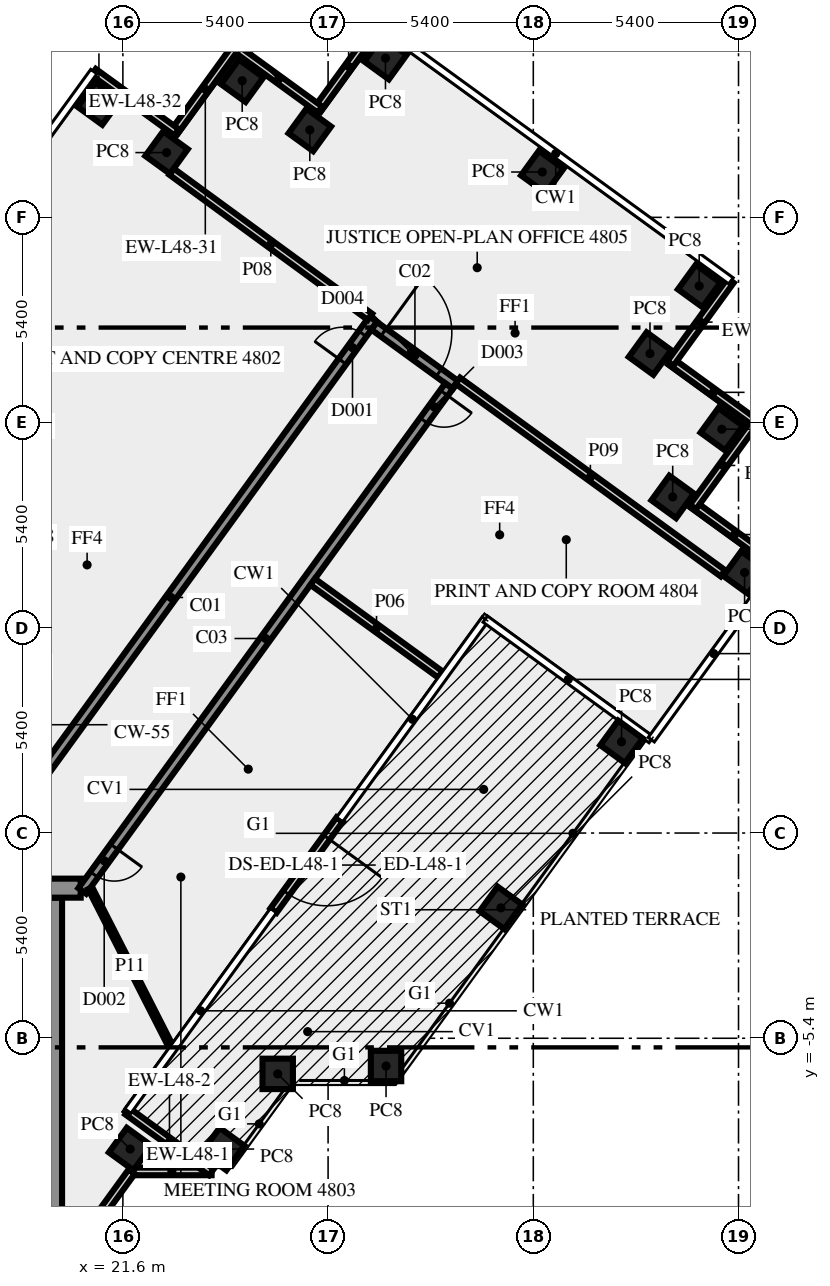
"""IFC4 building model, lengths in metres.
Left out: names, types, materials, properties, quantities, classifications, styles, units other than length and angle.
Written with IfcOpenShell. Run it as: python <this file> out.ifc"""

import sys

from ifc_helpers import new_model, si_unit, direction, frame, frame_2d, origin, origin_2d, place, context, subcontext, project, spatial, rectangle, extrude, element, fill, save


model = new_model("IFC4")
c1 = context("Model", 3, precision=1e-05, world=origin(), true_north=direction((0.0, 1.0)))
c2 = subcontext(c1, "Body", "Model", "MODEL_VIEW")
j1 = project(units=[si_unit("LENGTHUNIT", "METRE"), si_unit("PLANEANGLEUNIT", "RADIAN")], contexts=[c1])
p1 = place(None, origin())
s1 = spatial("IfcSite", under=j1, at=p1, CompositionType="ELEMENT")
p2 = place(p1, origin())
s2 = spatial("IfcBuilding", under=s1, at=p2, CompositionType="ELEMENT")
p3 = place(p2, frame((0.0, 0.0, 206.0)))
s3 = spatial("IfcBuildingStorey", under=s2, at=p3, CompositionType="ELEMENT", Elevation=206.0)
for number, where, z_axis, x_axis in (
    (1, (21.792, -8.315, 0.0), (0.0, 0.0, 1.0), (0.588, 0.809, 0.0)),
    (2, (24.235, -8.315, 0.0), (0.0, 0.0, 1.0), (0.588, 0.809, 0.0)),
    (3, (25.674, -6.337, 0.0), (0.0, 0.0, 1.0), (1.0, 0.0, 0.0)),
    (4, (28.525, -6.13, 0.0), (0.0, 0.0, 1.0), (1.0, 0.0, 0.0)),
    (5, (31.548, -1.969, 0.0), (0.0, 0.0, 1.0), (0.588, 0.809, 0.0)),
    (6, (34.722, 2.4, 0.0), (0.0, 0.0, 1.0), (0.588, 0.809, 0.0)),
    (7, (37.96, 6.855, 0.0), (0.0, 0.0, 1.0), (0.588, 0.809, 0.0)),
    (8, (36.068, 8.844, 0.0), (0.0, 0.0, 1.0), (0.588, 0.809, 0.0)),
    (9, (37.36, 10.625, 0.0), (0.0, 0.0, 1.0), (0.588, 0.809, 0.0)),
    (10, (35.471, 12.616, 0.0), (0.0, 0.0, 1.0), (-0.809, 0.588, 0.0)),
    (11, (36.765, 14.395, 0.0), (0.0, 0.0, 1.0), (-0.809, 0.588, 0.0)),
    (12, (32.637, 17.393, 0.0), (0.0, 0.0, 1.0), (-0.809, 0.588, 0.0)),
    (13, (28.51, 20.39, 0.0), (0.0, 0.0, 1.0), (-0.588, -0.809, 0.0)),
    (14, (26.519, 18.5, 0.0), (0.0, 0.0, 1.0), (-0.809, 0.588, 0.0)),
    (15, (24.74, 19.795, 0.0), (0.0, 0.0, 1.0), (-0.588, -0.809, 0.0)),
    (16, (22.749, 17.904, 0.0), (0.0, 0.0, 1.0), (-0.588, -0.809, 0.0)),
    (17, (20.97, 19.195, 0.0), (0.0, 0.0, 1.0), (-0.588, -0.809, 0.0)),
):
    element("IfcColumn", number, at=place(p3, frame(where, z_axis=z_axis, x_axis=x_axis)), inside=s3, PredefinedType="COLUMN", context=c2, shape_type="SweptSolid", body=[
        extrude(rectangle(XDim=0.8, YDim=0.8, at=origin_2d()), origin(), (0.0, 0.0, 1.0), 3.65),
    ])
p4 = place(p3, frame((21.843, -8.904, 0.0), z_axis=(0.0, 0.0, 1.0), x_axis=(1.0, 0.0, 0.0)))
e18 = element("IfcWall", 18, at=p4, inside=s3, PredefinedType="SOLIDWALL", context=c2, shape_type="SweptSolid", body=[
    extrude(rectangle(XDim=2.092, YDim=0.2, at=frame_2d((1.046, 0.0))), origin(), (0.0, 0.0, 1.0), 3.65),
])
p5 = place(p3, frame((23.928, -8.925, 0.0), z_axis=(0.0, 0.0, 1.0), x_axis=(-0.809038277723, 0.587755957162, 0.0)))
e19 = element("IfcWall", 19, at=p5, inside=s3, PredefinedType="SOLIDWALL", context=c2, shape_type="SweptSolid", body=[
    extrude(rectangle(XDim=2.724, YDim=0.2, at=frame_2d((1.362, 0.0))), origin(), (0.0, 0.0, 1.0), 3.65),
])
p6 = place(p3, frame((27.304, 0.356, 0.0), z_axis=(0.0, 0.0, 1.0), x_axis=(-0.587774760134, -0.809024617271, 0.0)))
e20 = element("IfcWall", 20, at=p6, inside=s3, PredefinedType="SOLIDWALL", context=c2, shape_type="SweptSolid", body=[
    extrude(rectangle(XDim=2.963, YDim=0.2, at=frame_2d((1.481, 0.0))), origin(), (0.0, 0.0, 1.0), 3.65),
])
p7 = place(p6, frame((0.582, 0.0, 0.0)))
e21 = element("IfcOpeningElement", 21, at=p7, cuts=e20, PredefinedType="OPENING", context=c2, shape_type="SweptSolid", body=[
    extrude(rectangle(XDim=1.8, YDim=2.4, at=frame_2d((0.9, 1.2))), frame((0.0, 0.11, 0.0), z_axis=(0.0, -1.0, 0.0), x_axis=(1.0, 0.0, 0.0)), (0.0, 0.0, 1.0), 0.22),
])
p8 = place(p3, frame((38.748, 7.09, 0.0), z_axis=(0.0, 0.0, 1.0), x_axis=(-0.80901210161, 0.587791986546, 0.0)))
e22 = element("IfcWall", 22, at=p8, inside=s3, PredefinedType="SOLIDWALL", context=c2, shape_type="SweptSolid", body=[
    extrude(rectangle(XDim=2.6, YDim=0.2, at=frame_2d((1.3, 0.0))), origin(), (0.0, 0.0, 1.0), 3.65),
])
for number, where, z_axis, x_axis in (
    (23, (36.602, 8.58, 0.0), (0.0, 0.0, 1.0), (0.588, 0.809, 0.0)),
    (24, (38.231, 10.802, 0.0), (0.0, 0.0, 1.0), (-0.809, 0.588, 0.0)),
):
    element("IfcWall", number, at=place(p3, frame(where, z_axis=z_axis, x_axis=x_axis)), inside=s3, PredefinedType="SOLIDWALL", context=c2, shape_type="SweptSolid", body=[
        extrude(rectangle(XDim=2.7, YDim=0.2, at=frame_2d((1.35, 0.0))), origin(), (0.0, 0.0, 1.0), 3.65),
    ])
p9 = place(p3, frame((20.253, -11.083, 0.0), z_axis=(0.0, 0.0, 1.0), x_axis=(0.587766567315, 0.809030569476, 0.0)))
e25 = element("IfcWall", 25, at=p9, inside=s3, PredefinedType="SOLIDWALL", context=c2, shape_type="SweptSolid", body=[
    extrude(rectangle(XDim=2.688, YDim=0.2, at=frame_2d((1.344, 0.0))), origin(), (0.0, 0.0, 1.0), 3.65),
])
for number, where, z_axis, x_axis in (
    (26, (36.005, 12.352, 0.0), (0.0, 0.0, 1.0), (0.588, 0.809, 0.0)),
    (27, (28.334, 21.262, 0.0), (0.0, 0.0, 1.0), (-0.588, -0.809, 0.0)),
):
    element("IfcWall", number, at=place(p3, frame(where, z_axis=z_axis, x_axis=x_axis)), inside=s3, PredefinedType="SOLIDWALL", context=c2, shape_type="SweptSolid", body=[
        extrude(rectangle(XDim=2.7, YDim=0.2, at=frame_2d((1.35, 0.0))), origin(), (0.0, 0.0, 1.0), 3.65),
    ])
p10 = place(p3, frame((26.785, 19.036, 0.0), z_axis=(0.0, 0.0, 1.0), x_axis=(-0.809064397168, 0.587720002413, 0.0)))
e28 = element("IfcWall", 28, at=p10, inside=s3, PredefinedType="SOLIDWALL", context=c2, shape_type="SweptSolid", body=[
    extrude(rectangle(XDim=2.7, YDim=0.2, at=frame_2d((1.35, 0.0))), origin(), (0.0, 0.0, 1.0), 3.65),
])
for number, where, z_axis, x_axis in (
    (29, (24.563, 20.665, 0.0), (0.0, 0.0, 1.0), (-0.588, -0.809, 0.0)),
    (30, (23.013, 18.438, 0.0), (0.0, 0.0, 1.0), (-0.809, 0.588, 0.0)),
):
    element("IfcWall", number, at=place(p3, frame(where, z_axis=z_axis, x_axis=x_axis)), inside=s3, PredefinedType="SOLIDWALL", context=c2, shape_type="SweptSolid", body=[
        extrude(rectangle(XDim=2.7, YDim=0.2, at=frame_2d((1.35, 0.0))), origin(), (0.0, 0.0, 1.0), 3.65),
    ])
p11 = place(p3, frame((19.75, -10.5, 0.0), z_axis=(0.0, 0.0, 1.0), x_axis=(0.0, 1.0, 0.0)))
e31 = element("IfcWall", 31, at=p11, inside=s3, PredefinedType="SHEAR", context=c2, shape_type="SweptSolid", body=[
    extrude(rectangle(XDim=8.8, YDim=0.5, at=frame_2d((4.4, 0.0))), origin(), (0.0, 0.0, 1.0), 3.65),
])
p12 = place(p3, frame((20.49, -1.45, 0.0), z_axis=(0.0, 0.0, 1.0), x_axis=(-1.0, 0.0, 0.0)))
e32 = element("IfcWall", 32, at=p12, inside=s3, PredefinedType="SHEAR", context=c2, shape_type="SweptSolid", body=[
    extrude(rectangle(XDim=40.98, YDim=0.5, at=frame_2d((20.49, 0.0))), origin(), (0.0, 0.0, 1.0), 3.65),
])
p13 = place(p12, frame((38.14, 0.0, 0.0)))
e33 = element("IfcOpeningElement", 33, at=p13, cuts=e32, PredefinedType="OPENING", context=c2, shape_type="SweptSolid", body=[
    extrude(rectangle(XDim=1.8, YDim=2.1, at=frame_2d((0.9, 1.05))), frame((0.0, 0.26, 0.0), z_axis=(0.0, -1.0, 0.0), x_axis=(1.0, 0.0, 0.0)), (0.0, 0.0, 1.0), 0.52),
])
p14 = place(p12, frame((36.728, 0.0, 0.0)))
e34 = element("IfcOpeningElement", 34, at=p14, cuts=e32, PredefinedType="OPENING", context=c2, shape_type="SweptSolid", body=[
    extrude(rectangle(XDim=0.8, YDim=2.1, at=frame_2d((0.4, 1.05))), frame((0.0, 0.26, 0.0), z_axis=(0.0, -1.0, 0.0), x_axis=(1.0, 0.0, 0.0)), (0.0, 0.0, 1.0), 0.52),
])
p15 = place(p12, frame((35.153, 0.0, 0.0)))
e35 = element("IfcOpeningElement", 35, at=p15, cuts=e32, PredefinedType="OPENING", context=c2, shape_type="SweptSolid", body=[
    extrude(rectangle(XDim=0.8, YDim=2.1, at=frame_2d((0.4, 1.05))), frame((0.0, 0.26, 0.0), z_axis=(0.0, -1.0, 0.0), x_axis=(1.0, 0.0, 0.0)), (0.0, 0.0, 1.0), 0.52),
])
p16 = place(p12, frame((32.94, 0.0, 0.0)))
e36 = element("IfcOpeningElement", 36, at=p16, cuts=e32, PredefinedType="OPENING", context=c2, shape_type="SweptSolid", body=[
    extrude(rectangle(XDim=0.9, YDim=2.1, at=frame_2d((0.45, 1.05))), frame((0.0, 0.26, 0.0), z_axis=(0.0, -1.0, 0.0), x_axis=(1.0, 0.0, 0.0)), (0.0, 0.0, 1.0), 0.52),
])
p17 = place(p12, frame((30.702, 0.0, 0.0)))
e37 = element("IfcOpeningElement", 37, at=p17, cuts=e32, PredefinedType="OPENING", context=c2, shape_type="SweptSolid", body=[
    extrude(rectangle(XDim=0.9, YDim=2.1, at=frame_2d((0.45, 1.05))), frame((0.0, 0.26, 0.0), z_axis=(0.0, -1.0, 0.0), x_axis=(1.0, 0.0, 0.0)), (0.0, 0.0, 1.0), 0.52),
])
p18 = place(p12, frame((28.64, 0.0, 0.0)))
e38 = element("IfcOpeningElement", 38, at=p18, cuts=e32, PredefinedType="OPENING", context=c2, shape_type="SweptSolid", body=[
    extrude(rectangle(XDim=0.9, YDim=2.1, at=frame_2d((0.45, 1.05))), frame((0.0, 0.26, 0.0), z_axis=(0.0, -1.0, 0.0), x_axis=(1.0, 0.0, 0.0)), (0.0, 0.0, 1.0), 0.52),
])
p19 = place(p12, frame((25.778, 0.0, 0.0)))
e39 = element("IfcOpeningElement", 39, at=p19, cuts=e32, PredefinedType="OPENING", context=c2, shape_type="SweptSolid", body=[
    extrude(rectangle(XDim=0.9, YDim=2.1, at=frame_2d((0.45, 1.05))), frame((0.0, 0.26, 0.0), z_axis=(0.0, -1.0, 0.0), x_axis=(1.0, 0.0, 0.0)), (0.0, 0.0, 1.0), 0.52),
])
p20 = place(p12, frame((19.59, 0.0, 0.0)))
e40 = element("IfcOpeningElement", 40, at=p20, cuts=e32, PredefinedType="OPENING", context=c2, shape_type="SweptSolid", body=[
    extrude(rectangle(XDim=2.0, YDim=2.1, at=frame_2d((1.0, 1.05))), frame((0.0, 0.26, 0.0), z_axis=(0.0, -1.0, 0.0), x_axis=(1.0, 0.0, 0.0)), (0.0, 0.0, 1.0), 0.52),
])
p21 = place(p12, frame((7.14, 0.0, 0.0)))
e41 = element("IfcOpeningElement", 41, at=p21, cuts=e32, PredefinedType="OPENING", context=c2, shape_type="SweptSolid", body=[
    extrude(rectangle(XDim=0.9, YDim=2.1, at=frame_2d((0.45, 1.05))), frame((0.0, 0.26, 0.0), z_axis=(0.0, -1.0, 0.0), x_axis=(1.0, 0.0, 0.0)), (0.0, 0.0, 1.0), 0.52),
])
p22 = place(p12, frame((4.19, 0.0, 0.0)))
e42 = element("IfcOpeningElement", 42, at=p22, cuts=e32, PredefinedType="OPENING", context=c2, shape_type="SweptSolid", body=[
    extrude(rectangle(XDim=0.9, YDim=2.1, at=frame_2d((0.45, 1.05))), frame((0.0, 0.26, 0.0), z_axis=(0.0, -1.0, 0.0), x_axis=(1.0, 0.0, 0.0)), (0.0, 0.0, 1.0), 0.52),
])
p23 = place(p12, frame((1.04, 0.0, 0.0)))
e43 = element("IfcOpeningElement", 43, at=p23, cuts=e32, PredefinedType="OPENING", context=c2, shape_type="SweptSolid", body=[
    extrude(rectangle(XDim=1.8, YDim=2.1, at=frame_2d((0.9, 1.05))), frame((0.0, 0.26, 0.0), z_axis=(0.0, -1.0, 0.0), x_axis=(1.0, 0.0, 0.0)), (0.0, 0.0, 1.0), 0.52),
])
p24 = place(p3, frame((17.545, -1.125, 0.0), z_axis=(0.0, 0.0, 1.0), x_axis=(0.58779555165, 0.809009511354, 0.0)))
e44 = element("IfcWall", 44, at=p24, inside=s3, PredefinedType="SOLIDWALL", context=c2, shape_type="SweptSolid", body=[
    extrude(rectangle(XDim=18.103, YDim=0.25, at=frame_2d((9.052, 0.0))), origin(), (0.0, 0.0, 1.0), 3.65),
])
p25 = place(p24, frame((16.728, 0.0, 0.0)))
e45 = element("IfcOpeningElement", 45, at=p25, cuts=e44, PredefinedType="OPENING", context=c2, shape_type="SweptSolid", body=[
    extrude(rectangle(XDim=0.9, YDim=2.1, at=frame_2d((0.45, 1.05))), frame((0.0, 0.135, 0.0), z_axis=(0.0, -1.0, 0.0), x_axis=(1.0, 0.0, 0.0)), (0.0, 0.0, 1.0), 0.27),
])
p26 = place(p3, frame((28.213, 13.346, 0.0), z_axis=(0.0, 0.0, 1.0), x_axis=(0.809006914995, -0.587799125119, 0.0)))
e46 = element("IfcWall", 46, at=p26, inside=s3, PredefinedType="SOLIDWALL", context=c2, shape_type="SweptSolid", body=[
    extrude(rectangle(XDim=2.65, YDim=0.25, at=frame_2d((1.325, 0.0))), origin(), (0.0, 0.0, 1.0), 3.65),
])
p27 = place(p26, frame((0.3, 0.0, 0.0)))
e47 = element("IfcOpeningElement", 47, at=p27, cuts=e46, PredefinedType="OPENING", context=c2, shape_type="SweptSolid", body=[
    extrude(rectangle(XDim=1.8, YDim=2.1, at=frame_2d((0.9, 1.05))), frame((0.0, 0.135, 0.0), z_axis=(0.0, -1.0, 0.0), x_axis=(1.0, 0.0, 0.0)), (0.0, 0.0, 1.0), 0.27),
])
p28 = place(p3, frame((30.183, 11.761, 0.0), z_axis=(0.0, 0.0, 1.0), x_axis=(-0.587781762867, -0.80901952958, 0.0)))
e48 = element("IfcWall", 48, at=p28, inside=s3, PredefinedType="SOLIDWALL", context=c2, shape_type="SweptSolid", body=[
    extrude(rectangle(XDim=16.42, YDim=0.25, at=frame_2d((8.21, 0.0))), origin(), (0.0, 0.0, 1.0), 3.65),
])
p29 = place(p28, frame((14.988, 0.0, 0.0)))
e49 = element("IfcOpeningElement", 49, at=p29, cuts=e48, PredefinedType="OPENING", context=c2, shape_type="SweptSolid", body=[
    extrude(rectangle(XDim=0.9, YDim=2.1, at=frame_2d((0.45, 1.05))), frame((0.0, 0.135, 0.0), z_axis=(0.0, -1.0, 0.0), x_axis=(1.0, 0.0, 0.0)), (0.0, 0.0, 1.0), 0.27),
])
p30 = place(p28, frame((0.225, 0.0, 0.0)))
e50 = element("IfcOpeningElement", 50, at=p30, cuts=e48, PredefinedType="OPENING", context=c2, shape_type="SweptSolid", body=[
    extrude(rectangle(XDim=0.9, YDim=2.1, at=frame_2d((0.45, 1.05))), frame((0.0, 0.135, 0.0), z_axis=(0.0, -1.0, 0.0), x_axis=(1.0, 0.0, 0.0)), (0.0, 0.0, 1.0), 0.27),
])
p31 = place(p3, frame((29.954, 4.172, 0.0), z_axis=(0.0, 0.0, 1.0), x_axis=(-0.809193718638, 0.587541935283, 0.0)))
e51 = element("IfcWall", 51, at=p31, inside=s3, PredefinedType="SOLIDWALL", context=c2, shape_type="SweptSolid", body=[
    extrude(rectangle(XDim=4.15, YDim=0.2, at=frame_2d((2.075, 0.0))), origin(), (0.0, 0.0, 1.0), 3.65),
])
p32 = place(p3, frame((22.884, 17.401, 0.0), z_axis=(0.0, 0.0, 1.0), x_axis=(0.80698686941, -0.590569380005, 0.0)))
e52 = element("IfcWall", 52, at=p32, inside=s3, PredefinedType="SOLIDWALL", context=c2, shape_type="SweptSolid", body=[
    extrude(rectangle(XDim=6.465, YDim=0.2, at=frame_2d((3.232, 0.0))), origin(), (0.0, 0.0, 1.0), 3.65),
])
p33 = place(p3, frame((30.415, 11.902, 0.0), z_axis=(0.0, 0.0, 1.0), x_axis=(0.809012783133, -0.587791048526, 0.0)))
e53 = element("IfcWall", 53, at=p33, inside=s3, PredefinedType="SOLIDWALL", context=c2, shape_type="SweptSolid", body=[
    extrude(rectangle(XDim=8.62, YDim=0.2, at=frame_2d((4.31, 0.0))), origin(), (0.0, 0.0, 1.0), 3.65),
])
p34 = place(p3, frame((20.739, -1.45, 0.0), z_axis=(0.0, 0.0, 1.0), x_axis=(0.453931312426, -0.891036679155, 0.0)))
e54 = element("IfcWall", 54, at=p34, inside=s3, PredefinedType="PARTITIONING", context=c2, shape_type="SweptSolid", body=[
    extrude(rectangle(XDim=4.629, YDim=0.12, at=frame_2d((2.314, 0.0))), origin(), (0.0, 0.0, 1.0), 3.65),
])
p35 = place(p7, origin())
e55 = element("IfcDoor", 55, at=p35, inside=s3, OperationType="DOUBLE_DOOR_SINGLE_SWING", PredefinedType="DOOR", context=c2, shape_type="SweptSolid", body=[
    extrude(rectangle(XDim=1.8, YDim=2.4, at=frame_2d((0.9, 1.2))), frame((0.0, 0.025, 0.0), z_axis=(0.0, -1.0, 0.0), x_axis=(1.0, 0.0, 0.0)), (0.0, 0.0, 1.0), 0.05),
])
fill(e21, e55)
p36 = place(p29, origin())
e56 = element("IfcDoor", 56, at=p36, inside=s3, OperationType="SINGLE_SWING_RIGHT", PredefinedType="DOOR", context=c2, shape_type="SweptSolid", body=[
    extrude(rectangle(XDim=0.9, YDim=2.1, at=frame_2d((0.45, 1.05))), frame((0.0, 0.025, 0.0), z_axis=(0.0, -1.0, 0.0), x_axis=(1.0, 0.0, 0.0)), (0.0, 0.0, 1.0), 0.05),
])
fill(e49, e56)
p37 = place(p27, origin())
e57 = element("IfcDoor", 57, at=p37, inside=s3, OperationType="DOUBLE_DOOR_SINGLE_SWING", PredefinedType="DOOR", context=c2, shape_type="SweptSolid", body=[
    extrude(rectangle(XDim=1.8, YDim=2.1, at=frame_2d((0.9, 1.05))), frame((0.0, 0.025, 0.0), z_axis=(0.0, -1.0, 0.0), x_axis=(1.0, 0.0, 0.0)), (0.0, 0.0, 1.0), 0.05),
])
fill(e47, e57)
p38 = place(p25, origin())
e58 = element("IfcDoor", 58, at=p38, inside=s3, OperationType="SINGLE_SWING_RIGHT", PredefinedType="DOOR", context=c2, shape_type="SweptSolid", body=[
    extrude(rectangle(XDim=0.9, YDim=2.1, at=frame_2d((0.45, 1.05))), frame((0.0, 0.025, 0.0), z_axis=(0.0, -1.0, 0.0), x_axis=(1.0, 0.0, 0.0)), (0.0, 0.0, 1.0), 0.05),
])
fill(e45, e58)
p39 = place(p30, origin())
e59 = element("IfcDoor", 59, at=p39, inside=s3, OperationType="SINGLE_SWING_LEFT", PredefinedType="DOOR", context=c2, shape_type="SweptSolid", body=[
    extrude(rectangle(XDim=0.9, YDim=2.1, at=frame_2d((0.45, 1.05))), frame((0.0, 0.025, 0.0), z_axis=(0.0, -1.0, 0.0), x_axis=(1.0, 0.0, 0.0)), (0.0, 0.0, 1.0), 0.05),
])
fill(e50, e59)
save(model, sys.argv[1])
